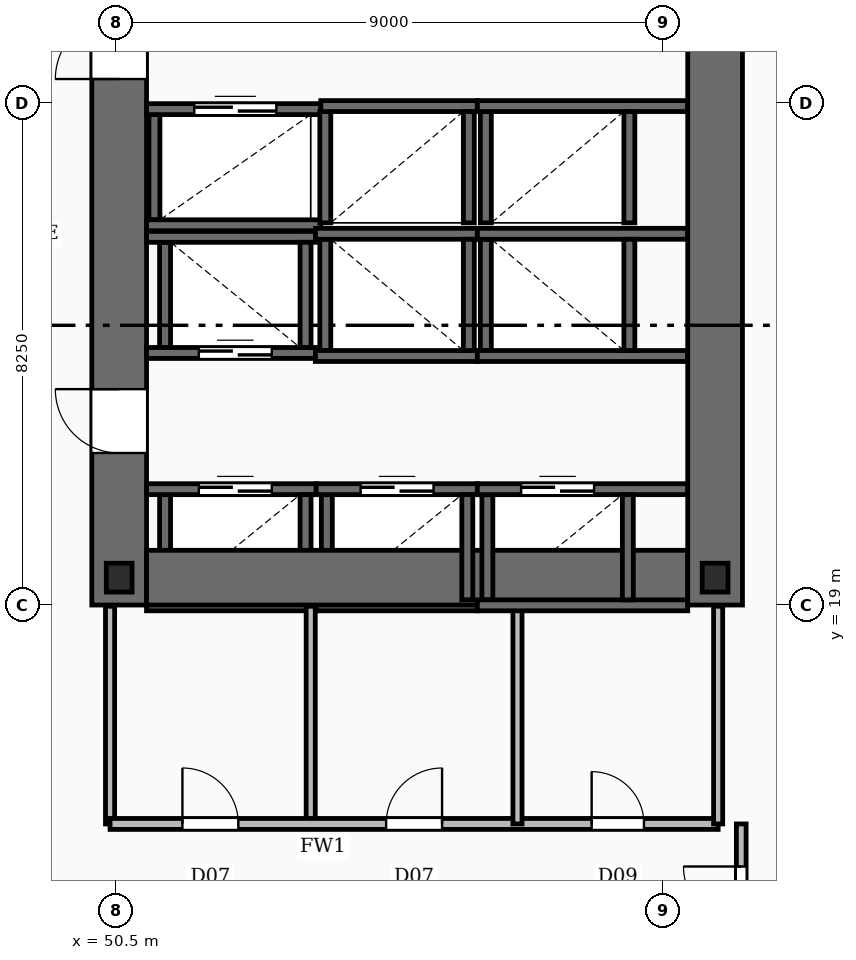
"""IFC4 building model, lengths in metres.
Left out: names, types, materials, properties, quantities, classifications, styles, units other than length and angle.
Written with IfcOpenShell. Run it as: python <this file> out.ifc"""

import sys

from ifc_helpers import new_model, si_unit, direction, frame, frame_2d, origin, origin_2d, place, context, subcontext, project, spatial, rectangle, i_section, extrude, element, fill, save


model = new_model("IFC4")
c1 = context("Model", 3, precision=1e-05, world=origin(), true_north=direction((0.0, 1.0)))
c2 = subcontext(c1, "Body", "Model", "MODEL_VIEW")
j1 = project(units=[si_unit("LENGTHUNIT", "METRE"), si_unit("PLANEANGLEUNIT", "RADIAN")], contexts=[c1])
p1 = place(None, origin())
s1 = spatial("IfcSite", under=j1, at=p1, CompositionType="ELEMENT")
p2 = place(p1, origin())
s2 = spatial("IfcBuilding", under=s1, at=p2, CompositionType="ELEMENT")
p3 = place(p2, frame((0.0, 0.0, 42.0)))
s3 = spatial("IfcBuildingStorey", under=s2, at=p3, CompositionType="ELEMENT", Elevation=42.0)
p4 = place(p3, frame((50.55, 19.0, -0.45), z_axis=(0.0, 0.0, 1.0), x_axis=(0.0, 1.0, 0.0)))
e1 = element("IfcWall", 1, at=p4, inside=s3, PredefinedType="SHEAR", context=c2, shape_type="SweptSolid", body=[
    extrude(rectangle(XDim=20.8, YDim=0.9, at=frame_2d((10.4, 0.0))), origin(), (0.0, 0.0, 1.0), 3.93),
])
p5 = place(p4, frame((2.5, 0.0, 0.45)))
e2 = element("IfcOpeningElement", 2, at=p5, cuts=e1, PredefinedType="OPENING", context=c2, shape_type="SweptSolid", body=[
    extrude(rectangle(XDim=1.05, YDim=2.15, at=frame_2d((0.525, 1.075))), frame((0.0, 0.46, 0.0), z_axis=(0.0, -1.0, 0.0), x_axis=(1.0, 0.0, 0.0)), (0.0, 0.0, 1.0), 0.92),
])
p6 = place(p4, frame((8.65, 0.0, 0.45)))
e3 = element("IfcOpeningElement", 3, at=p6, cuts=e1, PredefinedType="OPENING", context=c2, shape_type="SweptSolid", body=[
    extrude(rectangle(XDim=1.05, YDim=2.15, at=frame_2d((0.525, 1.075))), frame((0.0, 0.46, 0.0), z_axis=(0.0, -1.0, 0.0), x_axis=(1.0, 0.0, 0.0)), (0.0, 0.0, 1.0), 0.92),
])
p7 = place(p4, frame((14.62, 0.0, 0.45)))
e4 = element("IfcOpeningElement", 4, at=p7, cuts=e1, PredefinedType="OPENING", context=c2, shape_type="SweptSolid", body=[
    extrude(rectangle(XDim=1.1, YDim=2.15, at=frame_2d((0.55, 1.075))), frame((0.0, 0.46, 0.0), z_axis=(0.0, -1.0, 0.0), x_axis=(1.0, 0.0, 0.0)), (0.0, 0.0, 1.0), 0.92),
])
p8 = place(p3, frame((60.35, 19.0, -0.45), z_axis=(0.0, 0.0, 1.0), x_axis=(0.0, 1.0, 0.0)))
e5 = element("IfcWall", 5, at=p8, inside=s3, PredefinedType="SHEAR", context=c2, shape_type="SweptSolid", body=[
    extrude(rectangle(XDim=20.8, YDim=0.9, at=frame_2d((10.4, 0.0))), origin(), (0.0, 0.0, 1.0), 3.93),
])
p9 = place(p3, frame((51.0, 19.45, -0.45), z_axis=(0.0, 0.0, 1.0), x_axis=(1.0, 0.0, 0.0)))
e6 = element("IfcWall", 6, at=p9, inside=s3, PredefinedType="SHEAR", context=c2, shape_type="SweptSolid", body=[
    extrude(rectangle(XDim=8.9, YDim=0.9, at=frame_2d((4.45, 0.0))), origin(), (0.0, 0.0, 1.0), 3.93),
])
for number, where, z_axis, x_axis in (
    (7, (50.55, 19.45, -0.45), (0.0, 0.0, 1.0), (1.0, 0.0, 0.0)),
    (8, (60.35, 19.45, -0.45), (0.0, 0.0, 1.0), (1.0, 0.0, 0.0)),
):
    element("IfcColumn", number, at=place(p3, frame(where, z_axis=z_axis, x_axis=x_axis)), inside=s3, PredefinedType="COLUMN", context=c2, shape_type="SweptSolid", body=[
        extrude(i_section(OverallWidth=0.424, OverallDepth=0.474, WebThickness=0.048, FlangeThickness=0.077, FilletRadius=0.02, at=origin_2d()), origin(), (0.0, 0.0, 1.0), 3.93),
    ])
p10 = place(p3, frame((51.0, 20.905, 0.0), z_axis=(0.0, 0.0, 1.0), x_axis=(1.0, 0.0, 0.0)))
e9 = element("IfcWall", 9, at=p10, inside=s3, PredefinedType="SOLIDWALL", context=c2, shape_type="SweptSolid", body=[
    extrude(rectangle(XDim=2.79, YDim=0.18, at=frame_2d((1.395, 0.0))), origin(), (0.0, 0.0, 1.0), 3.48),
])
p11 = place(p10, frame((0.86, 0.0, 0.0)))
e10 = element("IfcOpeningElement", 10, at=p11, cuts=e9, PredefinedType="OPENING", context=c2, shape_type="SweptSolid", body=[
    extrude(rectangle(XDim=1.2, YDim=2.2, at=frame_2d((0.6, 1.1))), frame((0.0, 0.1, 0.0), z_axis=(0.0, -1.0, 0.0), x_axis=(1.0, 0.0, 0.0)), (0.0, 0.0, 1.0), 0.2),
])
p12 = place(p3, frame((51.0, 18.995, 0.0), z_axis=(0.0, 0.0, 1.0), x_axis=(1.0, 0.0, 0.0)))
e11 = element("IfcWall", 11, at=p12, inside=s3, PredefinedType="SOLIDWALL", context=c2, shape_type="SweptSolid", body=[
    extrude(rectangle(XDim=2.79, YDim=0.18, at=frame_2d((1.395, 0.0))), origin(), (0.0, 0.0, 1.0), 3.48),
])
for number, where, z_axis, x_axis in (
    (12, (51.305, 19.085, 0.0), (0.0, 0.0, 1.0), (0.0, 1.0, 0.0)),
    (13, (53.615, 19.085, 0.0), (0.0, 0.0, 1.0), (0.0, 1.0, 0.0)),
):
    element("IfcWall", number, at=place(p3, frame(where, z_axis=z_axis, x_axis=x_axis)), inside=s3, PredefinedType="SOLIDWALL", context=c2, shape_type="SweptSolid", body=[
        extrude(rectangle(XDim=1.73, YDim=0.18, at=frame_2d((0.865, 0.0))), origin(), (0.0, 0.0, 1.0), 3.48),
    ])
p13 = place(p3, frame((53.79, 20.905, 0.0), z_axis=(0.0, 0.0, 1.0), x_axis=(1.0, 0.0, 0.0)))
e14 = element("IfcWall", 14, at=p13, inside=s3, PredefinedType="SOLIDWALL", context=c2, shape_type="SweptSolid", body=[
    extrude(rectangle(XDim=2.65, YDim=0.18, at=frame_2d((1.325, 0.0))), origin(), (0.0, 0.0, 1.0), 3.48),
])
p14 = place(p13, frame((0.73, 0.0, 0.0)))
e15 = element("IfcOpeningElement", 15, at=p14, cuts=e14, PredefinedType="OPENING", context=c2, shape_type="SweptSolid", body=[
    extrude(rectangle(XDim=1.2, YDim=2.2, at=frame_2d((0.6, 1.1))), frame((0.0, 0.1, 0.0), z_axis=(0.0, -1.0, 0.0), x_axis=(1.0, 0.0, 0.0)), (0.0, 0.0, 1.0), 0.2),
])
p15 = place(p3, frame((53.79, 18.995, 0.0), z_axis=(0.0, 0.0, 1.0), x_axis=(1.0, 0.0, 0.0)))
e16 = element("IfcWall", 16, at=p15, inside=s3, PredefinedType="SOLIDWALL", context=c2, shape_type="SweptSolid", body=[
    extrude(rectangle(XDim=2.65, YDim=0.18, at=frame_2d((1.325, 0.0))), origin(), (0.0, 0.0, 1.0), 3.48),
])
for number, where, z_axis, x_axis in (
    (17, (53.965, 19.085, 0.0), (0.0, 0.0, 1.0), (0.0, 1.0, 0.0)),
    (18, (56.275, 19.085, 0.0), (0.0, 0.0, 1.0), (0.0, 1.0, 0.0)),
):
    element("IfcWall", number, at=place(p3, frame(where, z_axis=z_axis, x_axis=x_axis)), inside=s3, PredefinedType="SOLIDWALL", context=c2, shape_type="SweptSolid", body=[
        extrude(rectangle(XDim=1.73, YDim=0.18, at=frame_2d((0.865, 0.0))), origin(), (0.0, 0.0, 1.0), 3.48),
    ])
p16 = place(p3, frame((56.44, 20.905, 0.0), z_axis=(0.0, 0.0, 1.0), x_axis=(1.0, 0.0, 0.0)))
e19 = element("IfcWall", 19, at=p16, inside=s3, PredefinedType="SOLIDWALL", context=c2, shape_type="SweptSolid", body=[
    extrude(rectangle(XDim=3.46, YDim=0.18, at=frame_2d((1.73, 0.0))), origin(), (0.0, 0.0, 1.0), 3.48),
])
p17 = place(p16, frame((0.72, 0.0, 0.0)))
e20 = element("IfcOpeningElement", 20, at=p17, cuts=e19, PredefinedType="OPENING", context=c2, shape_type="SweptSolid", body=[
    extrude(rectangle(XDim=1.2, YDim=2.2, at=frame_2d((0.6, 1.1))), frame((0.0, 0.1, 0.0), z_axis=(0.0, -1.0, 0.0), x_axis=(1.0, 0.0, 0.0)), (0.0, 0.0, 1.0), 0.2),
])
p18 = place(p3, frame((56.44, 18.995, 0.0), z_axis=(0.0, 0.0, 1.0), x_axis=(1.0, 0.0, 0.0)))
e21 = element("IfcWall", 21, at=p18, inside=s3, PredefinedType="SOLIDWALL", context=c2, shape_type="SweptSolid", body=[
    extrude(rectangle(XDim=3.46, YDim=0.18, at=frame_2d((1.73, 0.0))), origin(), (0.0, 0.0, 1.0), 3.48),
])
for number, where, z_axis, x_axis in (
    (22, (56.605, 19.085, 0.0), (0.0, 0.0, 1.0), (0.0, 1.0, 0.0)),
    (23, (58.915, 19.085, 0.0), (0.0, 0.0, 1.0), (0.0, 1.0, 0.0)),
):
    element("IfcWall", number, at=place(p3, frame(where, z_axis=z_axis, x_axis=x_axis)), inside=s3, PredefinedType="SOLIDWALL", context=c2, shape_type="SweptSolid", body=[
        extrude(rectangle(XDim=1.73, YDim=0.18, at=frame_2d((0.865, 0.0))), origin(), (0.0, 0.0, 1.0), 3.48),
    ])
p19 = place(p3, frame((51.0, 25.055, 0.0), z_axis=(0.0, 0.0, 1.0), x_axis=(1.0, 0.0, 0.0)))
e24 = element("IfcWall", 24, at=p19, inside=s3, PredefinedType="SOLIDWALL", context=c2, shape_type="SweptSolid", body=[
    extrude(rectangle(XDim=2.778, YDim=0.18, at=frame_2d((1.389, 0.0))), origin(), (0.0, 0.0, 1.0), 3.48),
])
p20 = place(p3, frame((51.0, 23.145, 0.0), z_axis=(0.0, 0.0, 1.0), x_axis=(1.0, 0.0, 0.0)))
e25 = element("IfcWall", 25, at=p20, inside=s3, PredefinedType="SOLIDWALL", context=c2, shape_type="SweptSolid", body=[
    extrude(rectangle(XDim=2.778, YDim=0.18, at=frame_2d((1.389, 0.0))), origin(), (0.0, 0.0, 1.0), 3.48),
])
p21 = place(p20, frame((0.86, 0.0, 0.0)))
e26 = element("IfcOpeningElement", 26, at=p21, cuts=e25, PredefinedType="OPENING", context=c2, shape_type="SweptSolid", body=[
    extrude(rectangle(XDim=1.2, YDim=2.2, at=frame_2d((0.6, 1.1))), frame((0.0, 0.1, 0.0), z_axis=(0.0, -1.0, 0.0), x_axis=(1.0, 0.0, 0.0)), (0.0, 0.0, 1.0), 0.2),
])
for number, where, z_axis, x_axis in (
    (27, (51.305, 23.235, 0.0), (0.0, 0.0, 1.0), (0.0, 1.0, 0.0)),
    (28, (53.615, 23.235, 0.0), (0.0, 0.0, 1.0), (0.0, 1.0, 0.0)),
):
    element("IfcWall", number, at=place(p3, frame(where, z_axis=z_axis, x_axis=x_axis)), inside=s3, PredefinedType="SOLIDWALL", context=c2, shape_type="SweptSolid", body=[
        extrude(rectangle(XDim=1.73, YDim=0.18, at=frame_2d((0.865, 0.0))), origin(), (0.0, 0.0, 1.0), 3.48),
    ])
for number, where, z_axis, x_axis in (
    (29, (53.778, 25.105, 0.0), (0.0, 0.0, 1.0), (1.0, 0.0, 0.0)),
    (30, (53.778, 23.095, 0.0), (0.0, 0.0, 1.0), (1.0, 0.0, 0.0)),
):
    element("IfcWall", number, at=place(p3, frame(where, z_axis=z_axis, x_axis=x_axis)), inside=s3, PredefinedType="SOLIDWALL", context=c2, shape_type="SweptSolid", body=[
        extrude(rectangle(XDim=2.662, YDim=0.18, at=frame_2d((1.331, 0.0))), origin(), (0.0, 0.0, 1.0), 3.48),
    ])
for number, where, z_axis, x_axis in (
    (31, (53.94, 23.185, 0.0), (0.0, 0.0, 1.0), (0.0, 1.0, 0.0)),
    (32, (56.3, 23.185, 0.0), (0.0, 0.0, 1.0), (0.0, 1.0, 0.0)),
):
    element("IfcWall", number, at=place(p3, frame(where, z_axis=z_axis, x_axis=x_axis)), inside=s3, PredefinedType="SOLIDWALL", context=c2, shape_type="SweptSolid", body=[
        extrude(rectangle(XDim=1.83, YDim=0.18, at=frame_2d((0.915, 0.0))), origin(), (0.0, 0.0, 1.0), 3.48),
    ])
for number, where, z_axis, x_axis in (
    (33, (56.44, 25.105, 0.0), (0.0, 0.0, 1.0), (1.0, 0.0, 0.0)),
    (34, (56.44, 23.095, 0.0), (0.0, 0.0, 1.0), (1.0, 0.0, 0.0)),
):
    element("IfcWall", number, at=place(p3, frame(where, z_axis=z_axis, x_axis=x_axis)), inside=s3, PredefinedType="SOLIDWALL", context=c2, shape_type="SweptSolid", body=[
        extrude(rectangle(XDim=3.46, YDim=0.18, at=frame_2d((1.73, 0.0))), origin(), (0.0, 0.0, 1.0), 3.48),
    ])
for number, where, z_axis, x_axis in (
    (35, (56.58, 23.185, 0.0), (0.0, 0.0, 1.0), (0.0, 1.0, 0.0)),
    (36, (58.94, 23.185, 0.0), (0.0, 0.0, 1.0), (0.0, 1.0, 0.0)),
):
    element("IfcWall", number, at=place(p3, frame(where, z_axis=z_axis, x_axis=x_axis)), inside=s3, PredefinedType="SOLIDWALL", context=c2, shape_type="SweptSolid", body=[
        extrude(rectangle(XDim=1.83, YDim=0.18, at=frame_2d((0.915, 0.0))), origin(), (0.0, 0.0, 1.0), 3.48),
    ])
p22 = place(p3, frame((53.865, 27.205, 0.0), z_axis=(0.0, 0.0, 1.0), x_axis=(1.0, 0.0, 0.0)))
e37 = element("IfcWall", 37, at=p22, inside=s3, PredefinedType="SOLIDWALL", context=c2, shape_type="SweptSolid", body=[
    extrude(rectangle(XDim=2.575, YDim=0.18, at=frame_2d((1.288, 0.0))), origin(), (0.0, 0.0, 1.0), 3.48),
])
for number, where, z_axis, x_axis in (
    (38, (53.94, 25.285, 0.0), (0.0, 0.0, 1.0), (0.0, 1.0, 0.0)),
    (39, (56.3, 25.285, 0.0), (0.0, 0.0, 1.0), (0.0, 1.0, 0.0)),
):
    element("IfcWall", number, at=place(p3, frame(where, z_axis=z_axis, x_axis=x_axis)), inside=s3, PredefinedType="SOLIDWALL", context=c2, shape_type="SweptSolid", body=[
        extrude(rectangle(XDim=1.83, YDim=0.18, at=frame_2d((0.915, 0.0))), origin(), (0.0, 0.0, 1.0), 3.48),
    ])
p23 = place(p3, frame((56.44, 27.205, 0.0), z_axis=(0.0, 0.0, 1.0), x_axis=(1.0, 0.0, 0.0)))
e40 = element("IfcWall", 40, at=p23, inside=s3, PredefinedType="SOLIDWALL", context=c2, shape_type="SweptSolid", body=[
    extrude(rectangle(XDim=3.46, YDim=0.18, at=frame_2d((1.73, 0.0))), origin(), (0.0, 0.0, 1.0), 3.48),
])
for number, where, z_axis, x_axis in (
    (41, (56.58, 25.285, 0.0), (0.0, 0.0, 1.0), (0.0, 1.0, 0.0)),
    (42, (58.94, 25.285, 0.0), (0.0, 0.0, 1.0), (0.0, 1.0, 0.0)),
):
    element("IfcWall", number, at=place(p3, frame(where, z_axis=z_axis, x_axis=x_axis)), inside=s3, PredefinedType="SOLIDWALL", context=c2, shape_type="SweptSolid", body=[
        extrude(rectangle(XDim=1.83, YDim=0.18, at=frame_2d((0.915, 0.0))), origin(), (0.0, 0.0, 1.0), 3.48),
    ])
p24 = place(p3, frame((51.0, 27.155, 0.0), z_axis=(0.0, 0.0, 1.0), x_axis=(1.0, 0.0, 0.0)))
e43 = element("IfcWall", 43, at=p24, inside=s3, PredefinedType="SOLIDWALL", context=c2, shape_type="SweptSolid", body=[
    extrude(rectangle(XDim=2.865, YDim=0.18, at=frame_2d((1.433, 0.0))), origin(), (0.0, 0.0, 1.0), 3.48),
])
p25 = place(p24, frame((0.785, 0.0, 0.0)))
e44 = element("IfcOpeningElement", 44, at=p25, cuts=e43, PredefinedType="OPENING", context=c2, shape_type="SweptSolid", body=[
    extrude(rectangle(XDim=1.35, YDim=2.3, at=frame_2d((0.675, 1.15))), frame((0.0, 0.1, 0.0), z_axis=(0.0, -1.0, 0.0), x_axis=(1.0, 0.0, 0.0)), (0.0, 0.0, 1.0), 0.2),
])
p26 = place(p3, frame((51.0, 25.245, 0.0), z_axis=(0.0, 0.0, 1.0), x_axis=(1.0, 0.0, 0.0)))
e45 = element("IfcWall", 45, at=p26, inside=s3, PredefinedType="SOLIDWALL", context=c2, shape_type="SweptSolid", body=[
    extrude(rectangle(XDim=2.865, YDim=0.18, at=frame_2d((1.433, 0.0))), origin(), (0.0, 0.0, 1.0), 3.48),
])
p27 = place(p3, frame((51.13, 25.335, 0.0), z_axis=(0.0, 0.0, 1.0), x_axis=(0.0, 1.0, 0.0)))
e46 = element("IfcWall", 46, at=p27, inside=s3, PredefinedType="SOLIDWALL", context=c2, shape_type="SweptSolid", body=[
    extrude(rectangle(XDim=1.73, YDim=0.18, at=frame_2d((0.865, 0.0))), origin(), (0.0, 0.0, 1.0), 3.48),
])
for number, where, z_axis, x_axis in (
    (47, (53.7, 15.4, 0.0), (0.0, 0.0, 1.0), (0.0, 1.0, 0.0)),
    (48, (57.1, 15.4, 0.0), (0.0, 0.0, 1.0), (0.0, 1.0, 0.0)),
):
    element("IfcWall", number, at=place(p3, frame(where, z_axis=z_axis, x_axis=x_axis)), inside=s3, PredefinedType="PARTITIONING", context=c2, shape_type="SweptSolid", body=[
        extrude(rectangle(XDim=3.58, YDim=0.15, at=frame_2d((1.79, 0.0))), origin(), (0.0, 0.0, 1.0), 2.54),
    ])
p28 = place(p3, frame((50.4, 15.4, 0.0), z_axis=(0.0, 0.0, 1.0), x_axis=(1.0, 0.0, 0.0)))
e49 = element("IfcWall", 49, at=p28, inside=s3, PredefinedType="SOLIDWALL", context=c2, shape_type="SweptSolid", body=[
    extrude(rectangle(XDim=10.0, YDim=0.18, at=frame_2d((5.0, 0.0))), origin(), (0.0, 0.0, 1.0), 2.54),
])
p29 = place(p28, frame((1.19, 0.0, 0.0)))
e50 = element("IfcOpeningElement", 50, at=p29, cuts=e49, PredefinedType="OPENING", context=c2, shape_type="SweptSolid", body=[
    extrude(rectangle(XDim=0.92, YDim=2.1, at=frame_2d((0.46, 1.05))), frame((0.0, 0.1, 0.0), z_axis=(0.0, -1.0, 0.0), x_axis=(1.0, 0.0, 0.0)), (0.0, 0.0, 1.0), 0.2),
])
p30 = place(p28, frame((4.54, 0.0, 0.0)))
e51 = element("IfcOpeningElement", 51, at=p30, cuts=e49, PredefinedType="OPENING", context=c2, shape_type="SweptSolid", body=[
    extrude(rectangle(XDim=0.92, YDim=2.1, at=frame_2d((0.46, 1.05))), frame((0.0, 0.1, 0.0), z_axis=(0.0, -1.0, 0.0), x_axis=(1.0, 0.0, 0.0)), (0.0, 0.0, 1.0), 0.2),
])
p31 = place(p28, frame((7.92, 0.0, 0.0)))
e52 = element("IfcOpeningElement", 52, at=p31, cuts=e49, PredefinedType="OPENING", context=c2, shape_type="SweptSolid", body=[
    extrude(rectangle(XDim=0.86, YDim=2.05, at=frame_2d((0.43, 1.025))), frame((0.0, 0.1, 0.0), z_axis=(0.0, -1.0, 0.0), x_axis=(1.0, 0.0, 0.0)), (0.0, 0.0, 1.0), 0.2),
])
for number, where, z_axis, x_axis in (
    (53, (50.4, 15.4, 0.0), (0.0, 0.0, 1.0), (0.0, 1.0, 0.0)),
    (54, (60.4, 15.4, 0.0), (0.0, 0.0, 1.0), (0.0, 1.0, 0.0)),
):
    element("IfcWall", number, at=place(p3, frame(where, z_axis=z_axis, x_axis=x_axis)), inside=s3, PredefinedType="PARTITIONING", context=c2, shape_type="SweptSolid", body=[
        extrude(rectangle(XDim=3.58, YDim=0.15, at=frame_2d((1.79, 0.0))), origin(), (0.0, 0.0, 1.0), 2.54),
    ])
p32 = place(p3, frame((60.78, 13.1, 0.0), z_axis=(0.0, 0.0, 1.0), x_axis=(0.0, 1.0, 0.0)))
e55 = element("IfcWall", 55, at=p32, inside=s3, PredefinedType="PARTITIONING", context=c2, shape_type="SweptSolid", body=[
    extrude(rectangle(XDim=2.3, YDim=0.16, at=frame_2d((1.15, 0.0))), origin(), (0.0, 0.0, 1.0), 2.54),
])
p33 = place(p32, frame((0.65, 0.0, 0.0)))
e56 = element("IfcOpeningElement", 56, at=p33, cuts=e55, PredefinedType="OPENING", context=c2, shape_type="SweptSolid", body=[
    extrude(rectangle(XDim=0.95, YDim=2.15, at=frame_2d((0.475, 1.075))), frame((0.0, 0.09, 0.0), z_axis=(0.0, -1.0, 0.0), x_axis=(1.0, 0.0, 0.0)), (0.0, 0.0, 1.0), 0.18),
])
p34 = place(p5, origin())
e57 = element("IfcDoor", 57, at=p34, inside=s3, OperationType="SINGLE_SWING_RIGHT", PredefinedType="DOOR", context=c2, shape_type="SweptSolid", body=[
    extrude(rectangle(XDim=1.05, YDim=2.15, at=frame_2d((0.525, 1.075))), frame((0.0, 0.025, 0.0), z_axis=(0.0, -1.0, 0.0), x_axis=(1.0, 0.0, 0.0)), (0.0, 0.0, 1.0), 0.05),
])
fill(e2, e57)
p35 = place(p6, origin())
e58 = element("IfcDoor", 58, at=p35, inside=s3, OperationType="SINGLE_SWING_LEFT", PredefinedType="DOOR", context=c2, shape_type="SweptSolid", body=[
    extrude(rectangle(XDim=1.05, YDim=2.15, at=frame_2d((0.525, 1.075))), frame((0.0, 0.025, 0.0), z_axis=(0.0, -1.0, 0.0), x_axis=(1.0, 0.0, 0.0)), (0.0, 0.0, 1.0), 0.05),
])
fill(e3, e58)
p36 = place(p11, origin())
e59 = element("IfcDoor", 59, at=p36, inside=s3, OperationType="DOUBLE_DOOR_SLIDING", PredefinedType="DOOR", context=c2, shape_type="SweptSolid", body=[
    extrude(rectangle(XDim=1.2, YDim=2.2, at=frame_2d((0.6, 1.1))), frame((0.0, 0.025, 0.0), z_axis=(0.0, -1.0, 0.0), x_axis=(1.0, 0.0, 0.0)), (0.0, 0.0, 1.0), 0.05),
])
fill(e10, e59)
p37 = place(p14, origin())
e60 = element("IfcDoor", 60, at=p37, inside=s3, OperationType="DOUBLE_DOOR_SLIDING", PredefinedType="DOOR", context=c2, shape_type="SweptSolid", body=[
    extrude(rectangle(XDim=1.2, YDim=2.2, at=frame_2d((0.6, 1.1))), frame((0.0, 0.025, 0.0), z_axis=(0.0, -1.0, 0.0), x_axis=(1.0, 0.0, 0.0)), (0.0, 0.0, 1.0), 0.05),
])
fill(e15, e60)
p38 = place(p17, origin())
e61 = element("IfcDoor", 61, at=p38, inside=s3, OperationType="DOUBLE_DOOR_SLIDING", PredefinedType="DOOR", context=c2, shape_type="SweptSolid", body=[
    extrude(rectangle(XDim=1.2, YDim=2.2, at=frame_2d((0.6, 1.1))), frame((0.0, 0.025, 0.0), z_axis=(0.0, -1.0, 0.0), x_axis=(1.0, 0.0, 0.0)), (0.0, 0.0, 1.0), 0.05),
])
fill(e20, e61)
p39 = place(p21, origin())
e62 = element("IfcDoor", 62, at=p39, inside=s3, OperationType="DOUBLE_DOOR_SLIDING", PredefinedType="DOOR", context=c2, shape_type="SweptSolid", body=[
    extrude(rectangle(XDim=1.2, YDim=2.2, at=frame_2d((0.6, 1.1))), frame((0.0, 0.025, 0.0), z_axis=(0.0, -1.0, 0.0), x_axis=(1.0, 0.0, 0.0)), (0.0, 0.0, 1.0), 0.05),
])
fill(e26, e62)
p40 = place(p25, origin())
e63 = element("IfcDoor", 63, at=p40, inside=s3, OperationType="DOUBLE_DOOR_SLIDING", PredefinedType="DOOR", context=c2, shape_type="SweptSolid", body=[
    extrude(rectangle(XDim=1.35, YDim=2.3, at=frame_2d((0.675, 1.15))), frame((0.0, 0.025, 0.0), z_axis=(0.0, -1.0, 0.0), x_axis=(1.0, 0.0, 0.0)), (0.0, 0.0, 1.0), 0.05),
])
fill(e44, e63)
p41 = place(p29, origin())
e64 = element("IfcDoor", 64, at=p41, inside=s3, OperationType="SINGLE_SWING_LEFT", PredefinedType="DOOR", context=c2, shape_type="SweptSolid", body=[
    extrude(rectangle(XDim=0.92, YDim=2.1, at=frame_2d((0.46, 1.05))), frame((0.0, 0.025, 0.0), z_axis=(0.0, -1.0, 0.0), x_axis=(1.0, 0.0, 0.0)), (0.0, 0.0, 1.0), 0.05),
])
fill(e50, e64)
p42 = place(p30, origin())
e65 = element("IfcDoor", 65, at=p42, inside=s3, OperationType="SINGLE_SWING_RIGHT", PredefinedType="DOOR", context=c2, shape_type="SweptSolid", body=[
    extrude(rectangle(XDim=0.92, YDim=2.1, at=frame_2d((0.46, 1.05))), frame((0.0, 0.025, 0.0), z_axis=(0.0, -1.0, 0.0), x_axis=(1.0, 0.0, 0.0)), (0.0, 0.0, 1.0), 0.05),
])
fill(e51, e65)
p43 = place(p31, origin())
e66 = element("IfcDoor", 66, at=p43, inside=s3, OperationType="SINGLE_SWING_LEFT", PredefinedType="DOOR", context=c2, shape_type="SweptSolid", body=[
    extrude(rectangle(XDim=0.86, YDim=2.05, at=frame_2d((0.43, 1.025))), frame((0.0, 0.025, 0.0), z_axis=(0.0, -1.0, 0.0), x_axis=(1.0, 0.0, 0.0)), (0.0, 0.0, 1.0), 0.05),
])
fill(e52, e66)
p44 = place(p33, origin())
e67 = element("IfcDoor", 67, at=p44, inside=s3, OperationType="SINGLE_SWING_RIGHT", PredefinedType="DOOR", context=c2, shape_type="SweptSolid", body=[
    extrude(rectangle(XDim=0.95, YDim=2.15, at=frame_2d((0.475, 1.075))), frame((0.0, 0.025, 0.0), z_axis=(0.0, -1.0, 0.0), x_axis=(1.0, 0.0, 0.0)), (0.0, 0.0, 1.0), 0.05),
])
fill(e56, e67)
save(model, sys.argv[1])
